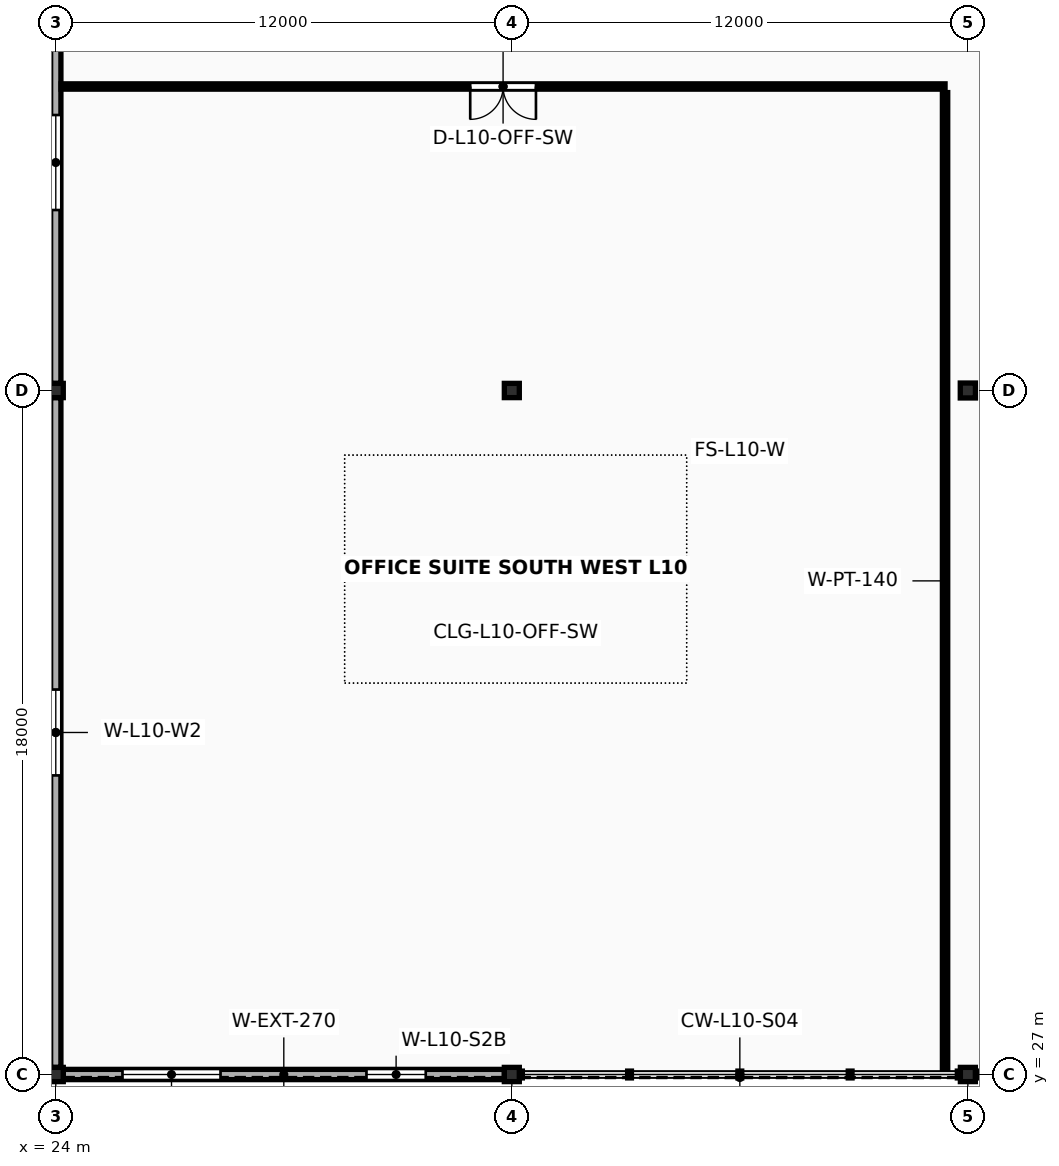
"""IFC4 building model, lengths in metres.
Left out: names, types, materials, properties, quantities, classifications, styles, units other than length and angle.
Written with IfcOpenShell. Run it as: python <this file> out.ifc"""

import sys

from ifc_helpers import new_model, si_unit, direction, frame, frame_2d, origin, origin_2d, place, context, subcontext, project, spatial, rectangle, i_section, extrude, element, fill, save


model = new_model("IFC4")
c1 = context("Model", 3, precision=1e-05, world=origin(), true_north=direction((0.0, 1.0)))
c2 = subcontext(c1, "Body", "Model", "MODEL_VIEW")
j1 = project(units=[si_unit("LENGTHUNIT", "METRE"), si_unit("PLANEANGLEUNIT", "RADIAN")], contexts=[c1])
p1 = place(None, origin())
s1 = spatial("IfcSite", under=j1, at=p1, CompositionType="ELEMENT")
p2 = place(p1, origin())
s2 = spatial("IfcBuilding", under=s1, at=p2, CompositionType="ELEMENT")
p3 = place(p2, frame((0.0, 0.0, 41.6)))
s3 = spatial("IfcBuildingStorey", under=s2, at=p3, CompositionType="ELEMENT", Elevation=41.6)
for number, where, z_axis, x_axis in (
    (1, (24.0, 27.0, 0.0), (0.0, 0.0, 1.0), (1.0, 0.0, 0.0)),
    (2, (24.0, 45.0, 0.0), (0.0, 0.0, 1.0), (1.0, 0.0, 0.0)),
    (3, (36.0, 27.0, 0.0), (0.0, 0.0, 1.0), (1.0, 0.0, 0.0)),
    (4, (36.0, 45.0, 0.0), (0.0, 0.0, 1.0), (1.0, 0.0, 0.0)),
    (5, (48.0, 27.0, 0.0), (0.0, 0.0, 1.0), (1.0, 0.0, 0.0)),
):
    element("IfcColumn", number, at=place(p3, frame(where, z_axis=z_axis, x_axis=x_axis)), inside=s3, PredefinedType="COLUMN", context=c2, shape_type="SweptSolid", body=[
        extrude(i_section(OverallWidth=0.394, OverallDepth=0.375, WebThickness=0.017, FlangeThickness=0.028, FilletRadius=0.018, at=origin_2d()), origin(), (0.0, 0.0, 1.0), 4.0),
    ])
p4 = place(p3, frame((48.0, 45.0, 0.0), z_axis=(0.0, 0.0, 1.0), x_axis=(1.0, 0.0, 0.0)))
e6 = element("IfcColumn", 6, at=p4, inside=s3, PredefinedType="COLUMN", context=c2, shape_type="SweptSolid", body=[
    extrude(i_section(OverallWidth=0.399, OverallDepth=0.393, WebThickness=0.023, FlangeThickness=0.037, FilletRadius=0.018, at=origin_2d()), origin(), (0.0, 0.0, 1.0), 4.0),
])
p5 = place(p3, frame((24.195, 27.0, 0.0), z_axis=(0.0, 0.0, 1.0), x_axis=(1.0, 0.0, 0.0)))
e7 = element("IfcWall", 7, at=p5, inside=s3, PredefinedType="SOLIDWALL", context=c2, shape_type="SweptSolid", body=[
    extrude(rectangle(XDim=11.61, YDim=0.27, at=frame_2d((5.805, 0.0))), origin(), (0.0, 0.0, 1.0), 3.281),
])
p6 = place(p5, frame((1.56, 0.0, 0.78)))
e8 = element("IfcOpeningElement", 8, at=p6, cuts=e7, PredefinedType="OPENING", context=c2, shape_type="SweptSolid", body=[
    extrude(rectangle(XDim=2.58, YDim=1.74, at=frame_2d((1.29, 0.87))), frame((0.0, 0.15, 0.0), z_axis=(0.0, -1.0, 0.0), x_axis=(1.0, 0.0, 0.0)), (0.0, 0.0, 1.0), 0.3),
])
p7 = place(p5, frame((7.98, 0.0, 0.78)))
e9 = element("IfcOpeningElement", 9, at=p7, cuts=e7, PredefinedType="OPENING", context=c2, shape_type="SweptSolid", body=[
    extrude(rectangle(XDim=1.56, YDim=1.9, at=frame_2d((0.78, 0.95))), frame((0.0, 0.15, 0.0), z_axis=(0.0, -1.0, 0.0), x_axis=(1.0, 0.0, 0.0)), (0.0, 0.0, 1.0), 0.3),
])
p8 = place(p3, frame((24.0, 27.186, 0.0), z_axis=(0.0, 0.0, 1.0), x_axis=(0.0, 1.0, 0.0)))
e10 = element("IfcWall", 10, at=p8, inside=s3, PredefinedType="SOLIDWALL", context=c2, shape_type="SweptSolid", body=[
    extrude(rectangle(XDim=17.629, YDim=0.27, at=frame_2d((8.814, 0.0))), origin(), (0.0, 0.0, 1.0), 3.281),
])
p9 = place(p8, frame((7.685, 0.0, 0.78)))
e11 = element("IfcOpeningElement", 11, at=p9, cuts=e10, PredefinedType="OPENING", context=c2, shape_type="SweptSolid", body=[
    extrude(rectangle(XDim=2.26, YDim=1.9, at=frame_2d((1.13, 0.95))), frame((0.0, 0.15, 0.0), z_axis=(0.0, -1.0, 0.0), x_axis=(1.0, 0.0, 0.0)), (0.0, 0.0, 1.0), 0.3),
])
p10 = place(p3, frame((24.0, 45.186, 0.0), z_axis=(0.0, 0.0, 1.0), x_axis=(0.0, 1.0, 0.0)))
e12 = element("IfcWall", 12, at=p10, inside=s3, PredefinedType="SOLIDWALL", context=c2, shape_type="SweptSolid", body=[
    extrude(rectangle(XDim=11.629, YDim=0.27, at=frame_2d((5.814, 0.0))), origin(), (0.0, 0.0, 1.0), 3.281),
])
p11 = place(p10, frame((4.564, 0.0, 0.78)))
e13 = element("IfcOpeningElement", 13, at=p11, cuts=e12, PredefinedType="OPENING", context=c2, shape_type="SweptSolid", body=[
    extrude(rectangle(XDim=2.5, YDim=1.9, at=frame_2d((1.25, 0.95))), frame((0.0, 0.15, 0.0), z_axis=(0.0, -1.0, 0.0), x_axis=(1.0, 0.0, 0.0)), (0.0, 0.0, 1.0), 0.3),
])
p12 = place(p3, frame((24.14, 53.0, 0.0), z_axis=(0.0, 0.0, 1.0), x_axis=(1.0, 0.0, 0.0)))
e14 = element("IfcWall", 14, at=p12, inside=s3, PredefinedType="PARTITIONING", context=c2, shape_type="SweptSolid", body=[
    extrude(rectangle(XDim=23.26, YDim=0.14, at=frame_2d((11.63, 0.0))), origin(), (0.0, 0.0, 1.0), 2.88),
])
p13 = place(p12, frame((10.765, 0.0, 0.0)))
e15 = element("IfcOpeningElement", 15, at=p13, cuts=e14, PredefinedType="OPENING", context=c2, shape_type="SweptSolid", body=[
    extrude(rectangle(XDim=1.73, YDim=2.37, at=frame_2d((0.865, 1.185))), frame((0.0, 0.085, 0.0), z_axis=(0.0, -1.0, 0.0), x_axis=(1.0, 0.0, 0.0)), (0.0, 0.0, 1.0), 0.17),
])
p14 = place(p3, frame((47.4, 27.14, 0.0), z_axis=(0.0, 0.0, 1.0), x_axis=(0.0, 1.0, 0.0)))
e16 = element("IfcWall", 16, at=p14, inside=s3, PredefinedType="PARTITIONING", context=c2, shape_type="SweptSolid", body=[
    extrude(rectangle(XDim=25.7, YDim=0.14, at=frame_2d((12.85, 0.0))), origin(), (0.0, 0.0, 1.0), 2.88),
])
p15 = place(p6, origin())
e17 = element("IfcWindow", 17, at=p15, inside=s3, PartitioningType="DOUBLE_PANEL_VERTICAL", PredefinedType="WINDOW", context=c2, shape_type="SweptSolid", body=[
    extrude(rectangle(XDim=2.58, YDim=1.74, at=frame_2d((1.29, 0.87))), frame((0.0, 0.03, 0.0), z_axis=(0.0, -1.0, 0.0), x_axis=(1.0, 0.0, 0.0)), (0.0, 0.0, 1.0), 0.06),
])
fill(e8, e17)
p16 = place(p7, origin())
e18 = element("IfcWindow", 18, at=p16, inside=s3, PartitioningType="SINGLE_PANEL", PredefinedType="WINDOW", context=c2, shape_type="SweptSolid", body=[
    extrude(rectangle(XDim=1.56, YDim=1.9, at=frame_2d((0.78, 0.95))), frame((0.0, 0.03, 0.0), z_axis=(0.0, -1.0, 0.0), x_axis=(1.0, 0.0, 0.0)), (0.0, 0.0, 1.0), 0.06),
])
fill(e9, e18)
p17 = place(p9, origin())
e19 = element("IfcWindow", 19, at=p17, inside=s3, PartitioningType="DOUBLE_PANEL_VERTICAL", PredefinedType="WINDOW", context=c2, shape_type="SweptSolid", body=[
    extrude(rectangle(XDim=2.26, YDim=1.9, at=frame_2d((1.13, 0.95))), frame((0.0, 0.03, 0.0), z_axis=(0.0, -1.0, 0.0), x_axis=(1.0, 0.0, 0.0)), (0.0, 0.0, 1.0), 0.06),
])
fill(e11, e19)
p18 = place(p11, origin())
e20 = element("IfcWindow", 20, at=p18, inside=s3, PartitioningType="DOUBLE_PANEL_VERTICAL", PredefinedType="WINDOW", context=c2, shape_type="SweptSolid", body=[
    extrude(rectangle(XDim=2.5, YDim=1.9, at=frame_2d((1.25, 0.95))), frame((0.0, 0.03, 0.0), z_axis=(0.0, -1.0, 0.0), x_axis=(1.0, 0.0, 0.0)), (0.0, 0.0, 1.0), 0.06),
])
fill(e13, e20)
p19 = place(p13, origin())
e21 = element("IfcDoor", 21, at=p19, inside=s3, OperationType="DOUBLE_DOOR_SINGLE_SWING", PredefinedType="DOOR", context=c2, shape_type="SweptSolid", body=[
    extrude(rectangle(XDim=1.73, YDim=2.37, at=frame_2d((0.865, 1.185))), frame((0.0, 0.025, 0.0), z_axis=(0.0, -1.0, 0.0), x_axis=(1.0, 0.0, 0.0)), (0.0, 0.0, 1.0), 0.05),
])
fill(e15, e21)
save(model, sys.argv[1])
